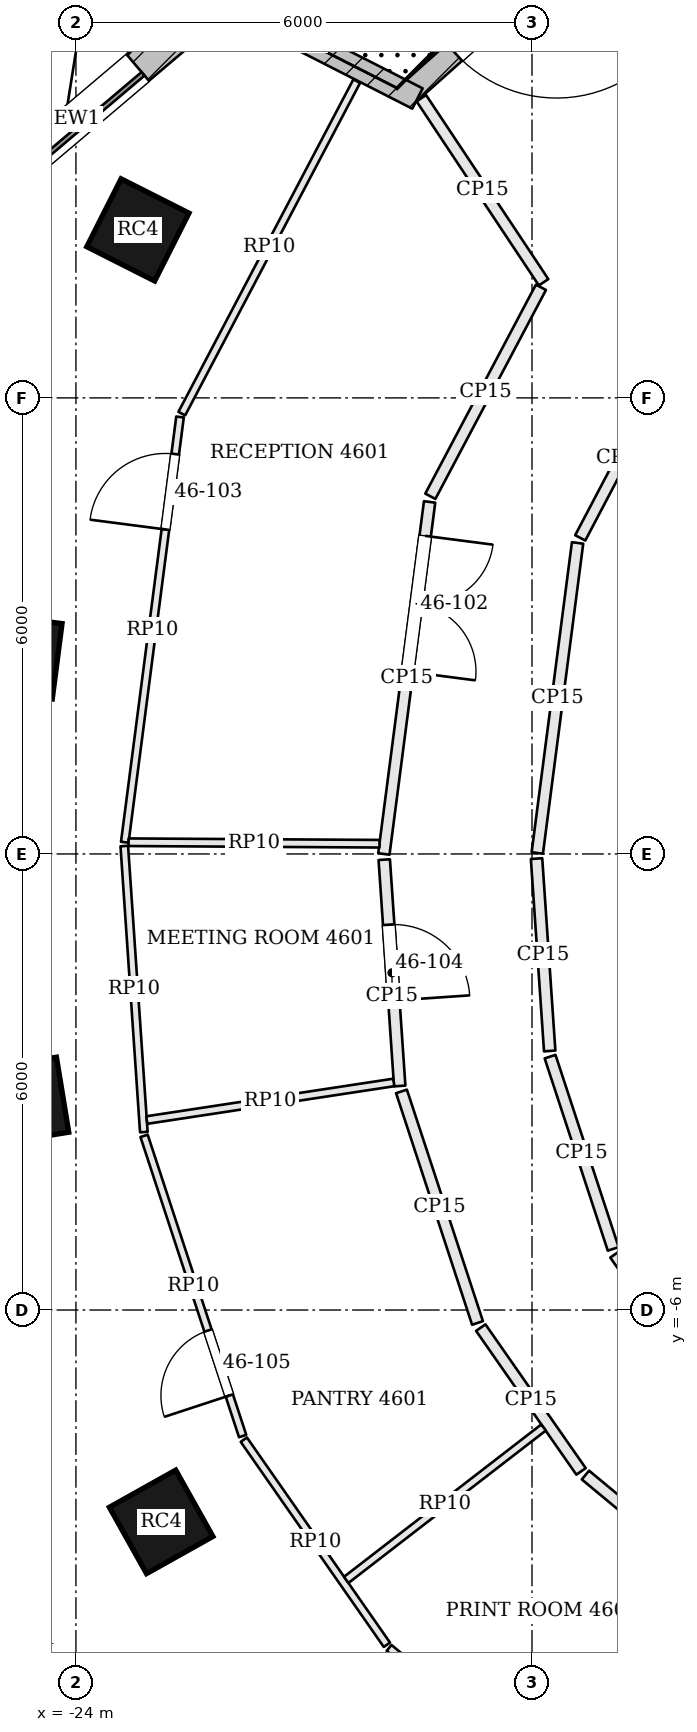
"""IFC4 building model, lengths in metres.
Left out: names, types, materials, properties, quantities, classifications, styles, units other than length and angle.
Written with IfcOpenShell. Run it as: python <this file> out.ifc"""

import sys

from ifc_helpers import new_model, si_unit, direction, frame, frame_2d, origin, origin_2d, place, context, subcontext, project, spatial, rectangle, extrude, element, fill, save


model = new_model("IFC4")
c1 = context("Model", 3, precision=1e-05, world=origin(), true_north=direction((0.0, 1.0)))
c2 = subcontext(c1, "Body", "Model", "MODEL_VIEW")
j1 = project(units=[si_unit("LENGTHUNIT", "METRE"), si_unit("PLANEANGLEUNIT", "RADIAN")], contexts=[c1])
p1 = place(None, origin())
s1 = spatial("IfcSite", under=j1, at=p1, CompositionType="ELEMENT")
p2 = place(p1, origin())
s2 = spatial("IfcBuilding", under=s1, at=p2, CompositionType="ELEMENT")
p3 = place(p2, frame((0.0, 0.0, 189.6)))
s3 = spatial("IfcBuildingStorey", under=s2, at=p3, CompositionType="ELEMENT", Elevation=189.6)
for number, where, z_axis, x_axis in (
    (1, (-23.185, 8.21, 0.0), (0.0, 0.0, 1.0), (-0.451, -0.893, 0.0)),
    (2, (-24.743, 2.599, 0.0), (0.0, 0.0, 1.0), (-0.128, -0.992, 0.0)),
    (3, (-24.669, -3.248, 0.0), (0.0, 0.0, 1.0), (0.162, -0.987, 0.0)),
    (4, (-22.879, -8.787, 0.0), (0.0, 0.0, 1.0), (0.489, -0.873, 0.0)),
):
    element("IfcColumn", number, at=place(p3, frame(where, z_axis=z_axis, x_axis=x_axis)), inside=s3, PredefinedType="COLUMN", context=c2, shape_type="SweptSolid", body=[
        extrude(rectangle(XDim=1.0, YDim=1.0, at=origin_2d()), origin(), (0.0, 0.0, 1.0), 3.9),
    ])
p4 = place(p3, frame((-17.022, 12.328, 0.0), z_axis=(0.0, 0.0, 1.0), x_axis=(-0.74635077665, -0.66555279144, 0.0)))
e5 = element("IfcWall", 5, at=p4, inside=s3, PredefinedType="SOLIDWALL", context=c2, shape_type="SweptSolid", body=[
    extrude(rectangle(XDim=3.553, YDim=0.3, at=frame_2d((1.777, 0.0))), origin(), (0.0, 0.0, 1.0), 3.35),
])
p5 = place(p4, frame((0.877, 0.0, 0.0)))
e6 = element("IfcOpeningElement", 6, at=p5, cuts=e5, PredefinedType="OPENING", context=c2, shape_type="SweptSolid", body=[
    extrude(rectangle(XDim=1.8, YDim=2.4, at=frame_2d((0.9, 1.2))), frame((0.0, 0.16, 0.0), z_axis=(0.0, -1.0, 0.0), x_axis=(1.0, 0.0, 0.0)), (0.0, 0.0, 1.0), 0.32),
])
p6 = place(p3, frame((-22.238, 11.147, 0.0), z_axis=(0.0, 0.0, 1.0), x_axis=(-0.762838614755, -0.64658893266, 0.0)))
e7 = element("IfcWall", 7, at=p6, inside=s3, PredefinedType="SOLIDWALL", context=c2, shape_type="SweptSolid", body=[
    extrude(rectangle(XDim=4.585, YDim=0.45, at=frame_2d((2.292, 0.0))), origin(), (0.0, 0.0, 1.0), 3.7),
])
p7 = place(p6, frame((1.242, 0.0, 0.9)))
e8 = element("IfcOpeningElement", 8, at=p7, cuts=e7, PredefinedType="OPENING", context=c2, shape_type="SweptSolid", body=[
    extrude(rectangle(XDim=2.1, YDim=2.3, at=frame_2d((1.05, 1.15))), frame((0.0, 0.235, 0.0), z_axis=(0.0, -1.0, 0.0), x_axis=(1.0, 0.0, 0.0)), (0.0, 0.0, 1.0), 0.47),
])
p8 = place(p3, frame((-22.538, 11.484, 0.0), z_axis=(0.0, 0.0, 1.0), x_axis=(0.890942009073, -0.454117095548, 0.0)))
e9 = element("IfcWall", 9, at=p8, inside=s3, PredefinedType="SOLIDWALL", context=c2, shape_type="SweptSolid", body=[
    extrude(rectangle(XDim=3.403, YDim=0.3, at=frame_2d((1.701, 0.0))), origin(), (0.0, 0.0, 1.0), 3.254),
])
p9 = place(p3, frame((-19.456, 9.943, 0.0), z_axis=(0.0, 0.0, 1.0), x_axis=(0.553343067853, -0.832953449635, 0.0)))
e10 = element("IfcWall", 10, at=p9, inside=s3, PredefinedType="PARTITIONING", context=c2, shape_type="SweptSolid", body=[
    extrude(rectangle(XDim=2.907, YDim=0.15, at=frame_2d((1.454, 0.0))), origin(), (0.0, 0.0, 1.0), 3.084),
])
p10 = place(p3, frame((-17.883, 7.455, 0.0), z_axis=(0.0, 0.0, 1.0), x_axis=(-0.467721822532, -0.883875724708, 0.0)))
e11 = element("IfcWall", 11, at=p10, inside=s3, PredefinedType="PARTITIONING", context=c2, shape_type="SweptSolid", body=[
    extrude(rectangle(XDim=3.11, YDim=0.15, at=frame_2d((1.555, 0.0))), origin(), (0.0, 0.0, 1.0), 3.084),
])
p11 = place(p3, frame((-19.347, 4.631, 0.0), z_axis=(0.0, 0.0, 1.0), x_axis=(-0.128813952733, -0.991668778162, 0.0)))
e12 = element("IfcWall", 12, at=p11, inside=s3, PredefinedType="PARTITIONING", context=c2, shape_type="SweptSolid", body=[
    extrude(rectangle(XDim=4.67, YDim=0.15, at=frame_2d((2.335, 0.0))), origin(), (0.0, 0.0, 1.0), 3.084),
])
p12 = place(p11, frame((0.45, 0.0, 0.0)))
e13 = element("IfcOpeningElement", 13, at=p12, cuts=e12, PredefinedType="OPENING", context=c2, shape_type="SweptSolid", body=[
    extrude(rectangle(XDim=1.8, YDim=2.1, at=frame_2d((0.9, 1.05))), frame((0.0, 0.085, 0.0), z_axis=(0.0, -1.0, 0.0), x_axis=(1.0, 0.0, 0.0)), (0.0, 0.0, 1.0), 0.17),
])
p13 = place(p3, frame((-19.944, -0.075, 0.0), z_axis=(0.0, 0.0, 1.0), x_axis=(0.068136763128, -0.997675990245, 0.0)))
e14 = element("IfcWall", 14, at=p13, inside=s3, PredefinedType="PARTITIONING", context=c2, shape_type="SweptSolid", body=[
    extrude(rectangle(XDim=2.985, YDim=0.15, at=frame_2d((1.492, 0.0))), origin(), (0.0, 0.0, 1.0), 3.084),
])
p14 = place(p13, frame((0.858, 0.0, 0.0)))
e15 = element("IfcOpeningElement", 15, at=p14, cuts=e14, PredefinedType="OPENING", context=c2, shape_type="SweptSolid", body=[
    extrude(rectangle(XDim=1.0, YDim=2.4, at=frame_2d((0.5, 1.2))), frame((0.0, 0.085, 0.0), z_axis=(0.0, -1.0, 0.0), x_axis=(1.0, 0.0, 0.0)), (0.0, 0.0, 1.0), 0.17),
])
p15 = place(p3, frame((-19.717, -3.124, 0.0), z_axis=(0.0, 0.0, 1.0), x_axis=(0.31188427026, -0.950120098706, 0.0)))
e16 = element("IfcWall", 16, at=p15, inside=s3, PredefinedType="PARTITIONING", context=c2, shape_type="SweptSolid", body=[
    extrude(rectangle(XDim=3.206, YDim=0.15, at=frame_2d((1.603, 0.0))), origin(), (0.0, 0.0, 1.0), 3.084),
])
p16 = place(p3, frame((-18.674, -6.232, 0.0), z_axis=(0.0, 0.0, 1.0), x_axis=(0.572118665737, -0.820170855563, 0.0)))
e17 = element("IfcWall", 17, at=p16, inside=s3, PredefinedType="PARTITIONING", context=c2, shape_type="SweptSolid", body=[
    extrude(rectangle(XDim=2.306, YDim=0.15, at=frame_2d((1.153, 0.0))), origin(), (0.0, 0.0, 1.0), 3.084),
])
p17 = place(p3, frame((-17.297, -8.171, 0.0), z_axis=(0.0, 0.0, 1.0), x_axis=(0.769228575061, -0.638973707839, 0.0)))
e18 = element("IfcWall", 18, at=p17, inside=s3, PredefinedType="PARTITIONING", context=c2, shape_type="SweptSolid", body=[
    extrude(rectangle(XDim=3.334, YDim=0.15, at=frame_2d((1.667, 0.0))), origin(), (0.0, 0.0, 1.0), 3.084),
])
p18 = place(p3, frame((-15.912, -6.696, 0.0), z_axis=(0.0, 0.0, 1.0), x_axis=(-0.572078533763, 0.820198848578, 0.0)))
e19 = element("IfcWall", 19, at=p18, inside=s3, PredefinedType="PARTITIONING", context=c2, shape_type="SweptSolid", body=[
    extrude(rectangle(XDim=1.742, YDim=0.15, at=frame_2d((0.871, 0.0))), origin(), (0.0, 0.0, 1.0), 3.084),
])
p19 = place(p3, frame((-16.932, -5.196, 0.0), z_axis=(0.0, 0.0, 1.0), x_axis=(-0.311904957484, 0.950113307715, 0.0)))
e20 = element("IfcWall", 20, at=p19, inside=s3, PredefinedType="PARTITIONING", context=c2, shape_type="SweptSolid", body=[
    extrude(rectangle(XDim=2.662, YDim=0.15, at=frame_2d((1.331, 0.0))), origin(), (0.0, 0.0, 1.0), 3.084),
])
p20 = place(p3, frame((-17.767, -2.592, 0.0), z_axis=(0.0, 0.0, 1.0), x_axis=(-0.068154548533, 0.997674775422, 0.0)))
e21 = element("IfcWall", 21, at=p20, inside=s3, PredefinedType="PARTITIONING", context=c2, shape_type="SweptSolid", body=[
    extrude(rectangle(XDim=2.536, YDim=0.15, at=frame_2d((1.268, 0.0))), origin(), (0.0, 0.0, 1.0), 3.084),
])
p21 = place(p3, frame((-17.93, 0.013, 0.0), z_axis=(0.0, 0.0, 1.0), x_axis=(0.128862113677, 0.991662521052, 0.0)))
e22 = element("IfcWall", 22, at=p21, inside=s3, PredefinedType="PARTITIONING", context=c2, shape_type="SweptSolid", body=[
    extrude(rectangle(XDim=4.113, YDim=0.15, at=frame_2d((2.057, 0.0))), origin(), (0.0, 0.0, 1.0), 3.084),
])
p22 = place(p3, frame((-17.365, 4.158, 0.0), z_axis=(0.0, 0.0, 1.0), x_axis=(0.465619619263, 0.884984954763, 0.0)))
e23 = element("IfcWall", 23, at=p22, inside=s3, PredefinedType="PARTITIONING", context=c2, shape_type="SweptSolid", body=[
    extrude(rectangle(XDim=2.38, YDim=0.15, at=frame_2d((1.19, 0.0))), origin(), (0.0, 0.0, 1.0), 3.084),
])
p23 = place(p3, frame((-16.62, -13.153, 0.0), z_axis=(0.0, 0.0, 1.0), x_axis=(-0.76922129881, 0.638982467253, 0.0)))
e24 = element("IfcWall", 24, at=p23, inside=s3, PredefinedType="PARTITIONING", context=c2, shape_type="SweptSolid", body=[
    extrude(rectangle(XDim=4.238, YDim=0.1, at=frame_2d((2.119, 0.0))), origin(), (0.0, 0.0, 1.0), 3.084),
])
p24 = place(p23, frame((2.85, 0.0, 0.0)))
e25 = element("IfcOpeningElement", 25, at=p24, cuts=e24, PredefinedType="OPENING", context=c2, shape_type="SweptSolid", body=[
    extrude(rectangle(XDim=0.9, YDim=2.1, at=frame_2d((0.45, 1.05))), frame((0.0, 0.06, 0.0), z_axis=(0.0, -1.0, 0.0), x_axis=(1.0, 0.0, 0.0)), (0.0, 0.0, 1.0), 0.12),
])
p25 = place(p3, frame((-19.909, -10.404, 0.0), z_axis=(0.0, 0.0, 1.0), x_axis=(-0.572111951901, 0.820175538828, 0.0)))
e26 = element("IfcWall", 26, at=p25, inside=s3, PredefinedType="PARTITIONING", context=c2, shape_type="SweptSolid", body=[
    extrude(rectangle(XDim=3.29, YDim=0.1, at=frame_2d((1.645, 0.0))), origin(), (0.0, 0.0, 1.0), 3.084),
])
p26 = place(p3, frame((-21.807, -7.658, 0.0), z_axis=(0.0, 0.0, 1.0), x_axis=(-0.31192534077, 0.95010661601, 0.0)))
e27 = element("IfcWall", 27, at=p26, inside=s3, PredefinedType="PARTITIONING", context=c2, shape_type="SweptSolid", body=[
    extrude(rectangle(XDim=4.157, YDim=0.1, at=frame_2d((2.079, 0.0))), origin(), (0.0, 0.0, 1.0), 3.084),
])
p27 = place(p26, frame((0.561, 0.0, 0.0)))
e28 = element("IfcOpeningElement", 28, at=p27, cuts=e27, PredefinedType="OPENING", context=c2, shape_type="SweptSolid", body=[
    extrude(rectangle(XDim=0.9, YDim=2.1, at=frame_2d((0.45, 1.05))), frame((0.0, 0.06, 0.0), z_axis=(0.0, -1.0, 0.0), x_axis=(1.0, 0.0, 0.0)), (0.0, 0.0, 1.0), 0.12),
])
p28 = place(p3, frame((-23.107, -3.659, 0.0), z_axis=(0.0, 0.0, 1.0), x_axis=(-0.068224497128, 0.997669994533, 0.0)))
e29 = element("IfcWall", 29, at=p28, inside=s3, PredefinedType="PARTITIONING", context=c2, shape_type="SweptSolid", body=[
    extrude(rectangle(XDim=3.772, YDim=0.1, at=frame_2d((1.886, 0.0))), origin(), (0.0, 0.0, 1.0), 3.084),
])
p29 = place(p3, frame((-23.357, 0.154, 0.0), z_axis=(0.0, 0.0, 1.0), x_axis=(0.128821187538, 0.991667838362, 0.0)))
e30 = element("IfcWall", 30, at=p29, inside=s3, PredefinedType="PARTITIONING", context=c2, shape_type="SweptSolid", body=[
    extrude(rectangle(XDim=5.642, YDim=0.1, at=frame_2d((2.821, 0.0))), origin(), (0.0, 0.0, 1.0), 3.084),
])
p30 = place(p29, frame((4.15, 0.0, 0.0)))
e31 = element("IfcOpeningElement", 31, at=p30, cuts=e30, PredefinedType="OPENING", context=c2, shape_type="SweptSolid", body=[
    extrude(rectangle(XDim=1.0, YDim=2.1, at=frame_2d((0.5, 1.05))), frame((0.0, 0.06, 0.0), z_axis=(0.0, -1.0, 0.0), x_axis=(1.0, 0.0, 0.0)), (0.0, 0.0, 1.0), 0.12),
])
p31 = place(p3, frame((-22.607, 5.793, 0.0), z_axis=(0.0, 0.0, 1.0), x_axis=(0.465632415416, 0.884978222169, 0.0)))
e32 = element("IfcWall", 32, at=p31, inside=s3, PredefinedType="PARTITIONING", context=c2, shape_type="SweptSolid", body=[
    extrude(rectangle(XDim=4.942, YDim=0.1, at=frame_2d((2.471, 0.0))), origin(), (0.0, 0.0, 1.0), 3.084),
])
p32 = place(p3, frame((-20.006, 0.135, 0.0), z_axis=(0.0, 0.0, 1.0), x_axis=(-0.999982056353, 0.005990573668, 0.0)))
e33 = element("IfcWall", 33, at=p32, inside=s3, PredefinedType="PARTITIONING", context=c2, shape_type="SweptSolid", body=[
    extrude(rectangle(XDim=3.301, YDim=0.1, at=frame_2d((1.65, 0.0))), origin(), (0.0, 0.0, 1.0), 3.084),
])
p33 = place(p3, frame((-19.818, -3.006, 0.0), z_axis=(0.0, 0.0, 1.0), x_axis=(-0.988610910333, -0.15049407952, 0.0)))
e34 = element("IfcWall", 34, at=p33, inside=s3, PredefinedType="PARTITIONING", context=c2, shape_type="SweptSolid", body=[
    extrude(rectangle(XDim=3.287, YDim=0.1, at=frame_2d((1.643, 0.0))), origin(), (0.0, 0.0, 1.0), 3.084),
])
p34 = place(p3, frame((-17.848, -7.546, 0.0), z_axis=(0.0, 0.0, 1.0), x_axis=(-0.791468360906, -0.611210138728, 0.0)))
e35 = element("IfcWall", 35, at=p34, inside=s3, PredefinedType="PARTITIONING", context=c2, shape_type="SweptSolid", body=[
    extrude(rectangle(XDim=3.279, YDim=0.1, at=frame_2d((1.64, 0.0))), origin(), (0.0, 0.0, 1.0), 3.084),
])
p35 = place(p5, origin())
e36 = element("IfcDoor", 36, at=p35, inside=s3, OperationType="DOUBLE_DOOR_DOUBLE_SWING", PredefinedType="DOOR", context=c2, shape_type="SweptSolid", body=[
    extrude(rectangle(XDim=1.8, YDim=2.4, at=frame_2d((0.9, 1.2))), frame((0.0, 0.025, 0.0), z_axis=(0.0, -1.0, 0.0), x_axis=(1.0, 0.0, 0.0)), (0.0, 0.0, 1.0), 0.05),
])
fill(e6, e36)
p36 = place(p7, origin())
e37 = element("IfcWindow", 37, at=p36, inside=s3, PartitioningType="SINGLE_PANEL", PredefinedType="WINDOW", context=c2, shape_type="SweptSolid", body=[
    extrude(rectangle(XDim=2.1, YDim=2.3, at=frame_2d((1.05, 1.15))), frame((0.0, 0.135, 0.0), z_axis=(0.0, -1.0, 0.0), x_axis=(1.0, 0.0, 0.0)), (0.0, 0.0, 1.0), 0.06),
])
fill(e8, e37)
p37 = place(p12, origin())
e38 = element("IfcDoor", 38, at=p37, inside=s3, OperationType="DOUBLE_DOOR_SINGLE_SWING", PredefinedType="DOOR", context=c2, shape_type="SweptSolid", body=[
    extrude(rectangle(XDim=1.8, YDim=2.1, at=frame_2d((0.9, 1.05))), frame((0.0, 0.025, 0.0), z_axis=(0.0, -1.0, 0.0), x_axis=(1.0, 0.0, 0.0)), (0.0, 0.0, 1.0), 0.05),
])
fill(e13, e38)
p38 = place(p30, origin())
e39 = element("IfcDoor", 39, at=p38, inside=s3, OperationType="SINGLE_SWING_LEFT", PredefinedType="DOOR", context=c2, shape_type="SweptSolid", body=[
    extrude(rectangle(XDim=1.0, YDim=2.1, at=frame_2d((0.5, 1.05))), frame((0.0, 0.025, 0.0), z_axis=(0.0, -1.0, 0.0), x_axis=(1.0, 0.0, 0.0)), (0.0, 0.0, 1.0), 0.05),
])
fill(e31, e39)
p39 = place(p14, origin())
e40 = element("IfcDoor", 40, at=p39, inside=s3, OperationType="SINGLE_SWING_RIGHT", PredefinedType="DOOR", context=c2, shape_type="SweptSolid", body=[
    extrude(rectangle(XDim=1.0, YDim=2.4, at=frame_2d((0.5, 1.2))), frame((0.0, 0.025, 0.0), z_axis=(0.0, -1.0, 0.0), x_axis=(1.0, 0.0, 0.0)), (0.0, 0.0, 1.0), 0.05),
])
fill(e15, e40)
p40 = place(p27, origin())
e41 = element("IfcDoor", 41, at=p40, inside=s3, OperationType="SINGLE_SWING_LEFT", PredefinedType="DOOR", context=c2, shape_type="SweptSolid", body=[
    extrude(rectangle(XDim=0.9, YDim=2.1, at=frame_2d((0.45, 1.05))), frame((0.0, 0.025, 0.0), z_axis=(0.0, -1.0, 0.0), x_axis=(1.0, 0.0, 0.0)), (0.0, 0.0, 1.0), 0.05),
])
fill(e28, e41)
save(model, sys.argv[1])
